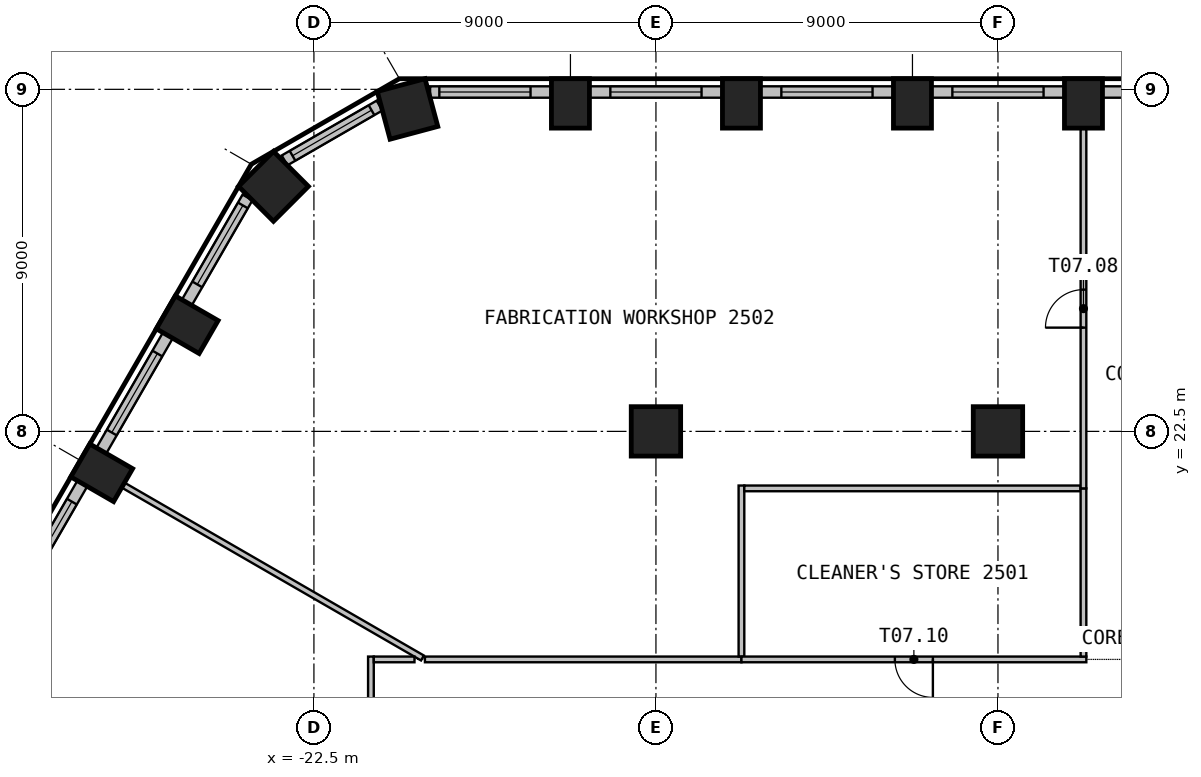
"""IFC4 building model, lengths in metres.
Left out: names, types, materials, properties, quantities, classifications, styles, units other than length and angle.
Written with IfcOpenShell. Run it as: python <this file> out.ifc"""

import sys

from ifc_helpers import new_model, si_unit, direction, frame, frame_2d, origin, origin_2d, place, context, subcontext, project, spatial, rectangle, circle, extrude, element, fill, save


model = new_model("IFC4")
c1 = context("Model", 3, precision=1e-05, world=origin(), true_north=direction((0.0, 1.0)))
c2 = subcontext(c1, "Body", "Model", "MODEL_VIEW")
j1 = project(units=[si_unit("LENGTHUNIT", "METRE"), si_unit("PLANEANGLEUNIT", "RADIAN")], contexts=[c1])
p1 = place(None, origin())
s1 = spatial("IfcSite", under=j1, at=p1, CompositionType="ELEMENT")
p2 = place(p1, origin())
s2 = spatial("IfcBuilding", under=s1, at=p2, CompositionType="ELEMENT")
p3 = place(p2, frame((0.0, 0.0, 104.7)))
s3 = spatial("IfcBuildingStorey", under=s2, at=p3, CompositionType="ELEMENT", Elevation=104.7)
for number, where, z_axis, x_axis in (
    (1, (-2.25, 31.13, 0.0), (0.0, 0.0, 1.0), (-1.0, 0.0, 0.0)),
    (2, (-6.75, 31.13, 0.0), (0.0, 0.0, 1.0), (-1.0, 0.0, 0.0)),
    (3, (-11.25, 31.13, 0.0), (0.0, 0.0, 1.0), (-1.0, 0.0, 0.0)),
    (4, (-15.75, 31.13, 0.0), (0.0, 0.0, 1.0), (-1.0, 0.0, 0.0)),
):
    element("IfcColumn", number, at=place(p3, frame(where, z_axis=z_axis, x_axis=x_axis)), inside=s3, PredefinedType="COLUMN", context=c2, shape_type="SweptSolid", body=[
        extrude(rectangle(XDim=1.0, YDim=1.3, at=origin_2d()), origin(), (0.0, 0.0, 1.0), 3.525),
    ])
for number, where, z_axis, x_axis in (
    (5, (-20.037, 30.984, 0.0), (0.0, 0.0, 1.0), (-0.966, -0.259, 0.0)),
    (6, (-23.564, 28.947, 0.0), (0.0, 0.0, 1.0), (-0.707, -0.707, 0.0)),
):
    element("IfcColumn", number, at=place(p3, frame(where, z_axis=z_axis, x_axis=x_axis)), inside=s3, PredefinedType="COLUMN", context=c2, shape_type="SweptSolid", body=[
        extrude(rectangle(XDim=1.3, YDim=1.3, at=origin_2d()), origin(), (0.0, 0.0, 1.0), 3.525),
    ])
for number, where, z_axis, x_axis in (
    (7, (-25.834, 25.308, 0.0), (0.0, 0.0, 1.0), (-0.5, -0.866, 0.0)),
    (8, (-28.084, 21.411, 0.0), (0.0, 0.0, 1.0), (-0.5, -0.866, 0.0)),
):
    element("IfcColumn", number, at=place(p3, frame(where, z_axis=z_axis, x_axis=x_axis)), inside=s3, PredefinedType="COLUMN", context=c2, shape_type="SweptSolid", body=[
        extrude(rectangle(XDim=1.0, YDim=1.3, at=origin_2d()), origin(), (0.0, 0.0, 1.0), 3.525),
    ])
for number, where, z_axis, x_axis in (
    (9, (-13.5, 22.5, 0.0), (0.0, 0.0, 1.0), (1.0, 0.0, 0.0)),
    (10, (-4.5, 22.5, 0.0), (0.0, 0.0, 1.0), (1.0, 0.0, 0.0)),
):
    element("IfcColumn", number, at=place(p3, frame(where, z_axis=z_axis, x_axis=x_axis)), inside=s3, PredefinedType="COLUMN", context=c2, shape_type="SweptSolid", body=[
        extrude(circle(Radius=0.65, at=origin_2d()), origin(), (0.0, 0.0, 1.0), 3.525),
    ])
p4 = place(p3, frame((1.75, 31.43, 0.0), z_axis=(0.0, 0.0, 1.0), x_axis=(-1.0, 0.0, 0.0)))
e11 = element("IfcWall", 11, at=p4, inside=s3, PredefinedType="SOLIDWALL", context=c2, shape_type="SweptSolid", body=[
    extrude(rectangle(XDim=3.499, YDim=0.3, at=frame_2d((1.75, 0.0))), origin(), (0.0, 0.0, 1.0), 3.525),
])
p5 = place(p4, frame((0.55, 0.0, 0.9)))
e12 = element("IfcOpeningElement", 12, at=p5, cuts=e11, PredefinedType="OPENING", context=c2, shape_type="SweptSolid", body=[
    extrude(rectangle(XDim=2.4, YDim=2.1, at=frame_2d((1.2, 1.05))), frame((0.0, 0.16, 0.0), z_axis=(0.0, -1.0, 0.0), x_axis=(1.0, 0.0, 0.0)), (0.0, 0.0, 1.0), 0.32),
])
p6 = place(p3, frame((-2.75, 31.43, 0.0), z_axis=(0.0, 0.0, 1.0), x_axis=(-1.0, 0.0, 0.0)))
e13 = element("IfcWall", 13, at=p6, inside=s3, PredefinedType="SOLIDWALL", context=c2, shape_type="SweptSolid", body=[
    extrude(rectangle(XDim=3.499, YDim=0.3, at=frame_2d((1.75, 0.0))), origin(), (0.0, 0.0, 1.0), 3.525),
])
p7 = place(p6, frame((0.55, 0.0, 0.9)))
e14 = element("IfcOpeningElement", 14, at=p7, cuts=e13, PredefinedType="OPENING", context=c2, shape_type="SweptSolid", body=[
    extrude(rectangle(XDim=2.4, YDim=2.1, at=frame_2d((1.2, 1.05))), frame((0.0, 0.16, 0.0), z_axis=(0.0, -1.0, 0.0), x_axis=(1.0, 0.0, 0.0)), (0.0, 0.0, 1.0), 0.32),
])
p8 = place(p3, frame((-7.25, 31.43, 0.0), z_axis=(0.0, 0.0, 1.0), x_axis=(-1.0, 0.0, 0.0)))
e15 = element("IfcWall", 15, at=p8, inside=s3, PredefinedType="SOLIDWALL", context=c2, shape_type="SweptSolid", body=[
    extrude(rectangle(XDim=3.499, YDim=0.3, at=frame_2d((1.75, 0.0))), origin(), (0.0, 0.0, 1.0), 3.525),
])
p9 = place(p8, frame((0.55, 0.0, 0.9)))
e16 = element("IfcOpeningElement", 16, at=p9, cuts=e15, PredefinedType="OPENING", context=c2, shape_type="SweptSolid", body=[
    extrude(rectangle(XDim=2.4, YDim=2.1, at=frame_2d((1.2, 1.05))), frame((0.0, 0.16, 0.0), z_axis=(0.0, -1.0, 0.0), x_axis=(1.0, 0.0, 0.0)), (0.0, 0.0, 1.0), 0.32),
])
p10 = place(p3, frame((-11.75, 31.43, 0.0), z_axis=(0.0, 0.0, 1.0), x_axis=(-1.0, 0.0, 0.0)))
e17 = element("IfcWall", 17, at=p10, inside=s3, PredefinedType="SOLIDWALL", context=c2, shape_type="SweptSolid", body=[
    extrude(rectangle(XDim=3.499, YDim=0.3, at=frame_2d((1.75, 0.0))), origin(), (0.0, 0.0, 1.0), 3.525),
])
p11 = place(p10, frame((0.55, 0.0, 0.9)))
e18 = element("IfcOpeningElement", 18, at=p11, cuts=e17, PredefinedType="OPENING", context=c2, shape_type="SweptSolid", body=[
    extrude(rectangle(XDim=2.4, YDim=2.1, at=frame_2d((1.2, 1.05))), frame((0.0, 0.16, 0.0), z_axis=(0.0, -1.0, 0.0), x_axis=(1.0, 0.0, 0.0)), (0.0, 0.0, 1.0), 0.32),
])
p12 = place(p3, frame((-16.25, 31.43, 0.0), z_axis=(0.0, 0.0, 1.0), x_axis=(-1.0, 0.0, 0.0)))
e19 = element("IfcWall", 19, at=p12, inside=s3, PredefinedType="SOLIDWALL", context=c2, shape_type="SweptSolid", body=[
    extrude(rectangle(XDim=3.192, YDim=0.3, at=frame_2d((1.596, 0.0))), origin(), (0.0, 0.0, 1.0), 3.525),
])
p13 = place(p12, frame((0.55, 0.0, 0.9)))
e20 = element("IfcOpeningElement", 20, at=p13, cuts=e19, PredefinedType="OPENING", context=c2, shape_type="SweptSolid", body=[
    extrude(rectangle(XDim=2.4, YDim=2.1, at=frame_2d((1.2, 1.05))), frame((0.0, 0.16, 0.0), z_axis=(0.0, -1.0, 0.0), x_axis=(1.0, 0.0, 0.0)), (0.0, 0.0, 1.0), 0.32),
])
p14 = place(p3, frame((-20.774, 31.073, 0.0), z_axis=(0.0, 0.0, 1.0), x_axis=(-0.866053149362, -0.49995194017, 0.0)))
e21 = element("IfcWall", 21, at=p14, inside=s3, PredefinedType="SOLIDWALL", context=c2, shape_type="SweptSolid", body=[
    extrude(rectangle(XDim=2.885, YDim=0.3, at=frame_2d((1.443, 0.0))), origin(), (0.0, 0.0, 1.0), 3.525),
])
p15 = place(p14, frame((0.243, 0.0, 0.9)))
e22 = element("IfcOpeningElement", 22, at=p15, cuts=e21, PredefinedType="OPENING", context=c2, shape_type="SweptSolid", body=[
    extrude(rectangle(XDim=2.4, YDim=2.1, at=frame_2d((1.2, 1.05))), frame((0.0, 0.16, 0.0), z_axis=(0.0, -1.0, 0.0), x_axis=(1.0, 0.0, 0.0)), (0.0, 0.0, 1.0), 0.32),
])
p16 = place(p3, frame((-24.248, 28.656, 0.0), z_axis=(0.0, 0.0, 1.0), x_axis=(-0.500004907028, -0.866022570692, 0.0)))
e23 = element("IfcWall", 23, at=p16, inside=s3, PredefinedType="SOLIDWALL", context=c2, shape_type="SweptSolid", body=[
    extrude(rectangle(XDim=3.192, YDim=0.3, at=frame_2d((1.596, 0.0))), origin(), (0.0, 0.0, 1.0), 3.525),
])
p17 = place(p16, frame((0.243, 0.0, 0.9)))
e24 = element("IfcOpeningElement", 24, at=p17, cuts=e23, PredefinedType="OPENING", context=c2, shape_type="SweptSolid", body=[
    extrude(rectangle(XDim=2.4, YDim=2.1, at=frame_2d((1.2, 1.05))), frame((0.0, 0.16, 0.0), z_axis=(0.0, -1.0, 0.0), x_axis=(1.0, 0.0, 0.0)), (0.0, 0.0, 1.0), 0.32),
])
p18 = place(p3, frame((-26.344, 25.024, 0.0), z_axis=(0.0, 0.0, 1.0), x_axis=(-0.499996256241, -0.866027565234, 0.0)))
e25 = element("IfcWall", 25, at=p18, inside=s3, PredefinedType="SOLIDWALL", context=c2, shape_type="SweptSolid", body=[
    extrude(rectangle(XDim=3.499, YDim=0.3, at=frame_2d((1.75, 0.0))), origin(), (0.0, 0.0, 1.0), 3.525),
])
p19 = place(p18, frame((0.55, 0.0, 0.9)))
e26 = element("IfcOpeningElement", 26, at=p19, cuts=e25, PredefinedType="OPENING", context=c2, shape_type="SweptSolid", body=[
    extrude(rectangle(XDim=2.4, YDim=2.1, at=frame_2d((1.2, 1.05))), frame((0.0, 0.16, 0.0), z_axis=(0.0, -1.0, 0.0), x_axis=(1.0, 0.0, 0.0)), (0.0, 0.0, 1.0), 0.32),
])
p20 = place(p3, frame((-28.594, 21.127, 0.0), z_axis=(0.0, 0.0, 1.0), x_axis=(-0.499996256241, -0.866027565234, 0.0)))
e27 = element("IfcWall", 27, at=p20, inside=s3, PredefinedType="SOLIDWALL", context=c2, shape_type="SweptSolid", body=[
    extrude(rectangle(XDim=3.499, YDim=0.3, at=frame_2d((1.75, 0.0))), origin(), (0.0, 0.0, 1.0), 3.525),
])
p21 = place(p20, frame((0.55, 0.0, 0.9)))
e28 = element("IfcOpeningElement", 28, at=p21, cuts=e27, PredefinedType="OPENING", context=c2, shape_type="SweptSolid", body=[
    extrude(rectangle(XDim=2.4, YDim=2.1, at=frame_2d((1.2, 1.05))), frame((0.0, 0.16, 0.0), z_axis=(0.0, -1.0, 0.0), x_axis=(1.0, 0.0, 0.0)), (0.0, 0.0, 1.0), 0.32),
])
p22 = place(p3, frame((-27.504, 21.076, 0.0), z_axis=(0.0, 0.0, 1.0), x_axis=(0.866004606565, -0.500036020111, 0.0)))
e29 = element("IfcWall", 29, at=p22, inside=s3, PredefinedType="PARTITIONING", context=c2, shape_type="SweptSolid", body=[
    extrude(rectangle(XDim=9.076, YDim=0.15, at=frame_2d((4.538, 0.0))), origin(), (0.0, 0.0, 1.0), 3.525),
])
p23 = place(p3, frame((-21.0, 16.575, 0.0), z_axis=(0.0, 0.0, 1.0), x_axis=(0.0, -1.0, 0.0)))
e30 = element("IfcWall", 30, at=p23, inside=s3, PredefinedType="PARTITIONING", context=c2, shape_type="SweptSolid", body=[
    extrude(rectangle(XDim=14.25, YDim=0.15, at=frame_2d((7.125, 0.0))), origin(), (0.0, 0.0, 1.0), 3.525),
])
p24 = place(p23, frame((6.625, 0.0, 0.0)))
e31 = element("IfcOpeningElement", 31, at=p24, cuts=e30, PredefinedType="OPENING", context=c2, shape_type="SweptSolid", body=[
    extrude(rectangle(XDim=1.0, YDim=2.1, at=frame_2d((0.5, 1.05))), frame((0.0, 0.085, 0.0), z_axis=(0.0, -1.0, 0.0), x_axis=(1.0, 0.0, 0.0)), (0.0, 0.0, 1.0), 0.17),
])
p25 = place(p3, frame((-19.854, 16.5, 0.0), z_axis=(0.0, 0.0, 1.0), x_axis=(-1.0, 0.0, 0.0)))
e32 = element("IfcWall", 32, at=p25, inside=s3, PredefinedType="PARTITIONING", context=c2, shape_type="SweptSolid", body=[
    extrude(rectangle(XDim=1.071, YDim=0.15, at=frame_2d((0.536, 0.0))), origin(), (0.0, 0.0, 1.0), 3.525),
])
p26 = place(p3, frame((-11.25, 16.5, 0.0), z_axis=(0.0, 0.0, 1.0), x_axis=(-1.0, 0.0, 0.0)))
e33 = element("IfcWall", 33, at=p26, inside=s3, PredefinedType="PARTITIONING", context=c2, shape_type="SweptSolid", body=[
    extrude(rectangle(XDim=8.329, YDim=0.15, at=frame_2d((4.165, 0.0))), origin(), (0.0, 0.0, 1.0), 3.525),
])
p27 = place(p3, frame((-11.25, 21.075, 0.0), z_axis=(0.0, 0.0, 1.0), x_axis=(0.0, -1.0, 0.0)))
e34 = element("IfcWall", 34, at=p27, inside=s3, PredefinedType="PARTITIONING", context=c2, shape_type="SweptSolid", body=[
    extrude(rectangle(XDim=4.5, YDim=0.15, at=frame_2d((2.25, 0.0))), origin(), (0.0, 0.0, 1.0), 3.525),
])
p28 = place(p3, frame((-2.175, 16.5, 0.0), z_axis=(0.0, 0.0, 1.0), x_axis=(-1.0, 0.0, 0.0)))
e35 = element("IfcWall", 35, at=p28, inside=s3, PredefinedType="PARTITIONING", context=c2, shape_type="SweptSolid", body=[
    extrude(rectangle(XDim=9.075, YDim=0.15, at=frame_2d((4.538, 0.0))), origin(), (0.0, 0.0, 1.0), 3.525),
])
p29 = place(p28, frame((4.038, 0.0, 0.0)))
e36 = element("IfcOpeningElement", 36, at=p29, cuts=e35, PredefinedType="OPENING", context=c2, shape_type="SweptSolid", body=[
    extrude(rectangle(XDim=1.0, YDim=2.1, at=frame_2d((0.5, 1.05))), frame((0.0, 0.085, 0.0), z_axis=(0.0, -1.0, 0.0), x_axis=(1.0, 0.0, 0.0)), (0.0, 0.0, 1.0), 0.17),
])
p30 = place(p3, frame((-2.325, 21.0, 0.0), z_axis=(0.0, 0.0, 1.0), x_axis=(-1.0, 0.0, 0.0)))
e37 = element("IfcWall", 37, at=p30, inside=s3, PredefinedType="PARTITIONING", context=c2, shape_type="SweptSolid", body=[
    extrude(rectangle(XDim=8.85, YDim=0.15, at=frame_2d((4.425, 0.0))), origin(), (0.0, 0.0, 1.0), 3.525),
])
p31 = place(p3, frame((-2.25, 16.575, 0.0), z_axis=(0.0, 0.0, 1.0), x_axis=(0.0, 1.0, 0.0)))
e38 = element("IfcWall", 38, at=p31, inside=s3, PredefinedType="PARTITIONING", context=c2, shape_type="SweptSolid", body=[
    extrude(rectangle(XDim=4.425, YDim=0.15, at=frame_2d((2.212, 0.0))), origin(), (0.0, 0.0, 1.0), 3.525),
])
p32 = place(p3, frame((-2.25, 21.0, 0.0), z_axis=(0.0, 0.0, 1.0), x_axis=(0.0, 1.0, 0.0)))
e39 = element("IfcWall", 39, at=p32, inside=s3, PredefinedType="PARTITIONING", context=c2, shape_type="SweptSolid", body=[
    extrude(rectangle(XDim=9.46, YDim=0.15, at=frame_2d((4.73, 0.0))), origin(), (0.0, 0.0, 1.0), 3.525),
])
p33 = place(p32, frame((4.23, 0.0, 0.0)))
e40 = element("IfcOpeningElement", 40, at=p33, cuts=e39, PredefinedType="OPENING", context=c2, shape_type="SweptSolid", body=[
    extrude(rectangle(XDim=1.0, YDim=2.1, at=frame_2d((0.5, 1.05))), frame((0.0, 0.085, 0.0), z_axis=(0.0, -1.0, 0.0), x_axis=(1.0, 0.0, 0.0)), (0.0, 0.0, 1.0), 0.17),
])
p34 = place(p7, origin())
e41 = element("IfcWindow", 41, at=p34, inside=s3, PartitioningType="SINGLE_PANEL", PredefinedType="WINDOW", context=c2, shape_type="SweptSolid", body=[
    extrude(rectangle(XDim=2.4, YDim=2.1, at=frame_2d((1.2, 1.05))), frame((0.0, 0.03, 0.0), z_axis=(0.0, -1.0, 0.0), x_axis=(1.0, 0.0, 0.0)), (0.0, 0.0, 1.0), 0.06),
])
fill(e14, e41)
p35 = place(p9, origin())
e42 = element("IfcWindow", 42, at=p35, inside=s3, PartitioningType="SINGLE_PANEL", PredefinedType="WINDOW", context=c2, shape_type="SweptSolid", body=[
    extrude(rectangle(XDim=2.4, YDim=2.1, at=frame_2d((1.2, 1.05))), frame((0.0, 0.03, 0.0), z_axis=(0.0, -1.0, 0.0), x_axis=(1.0, 0.0, 0.0)), (0.0, 0.0, 1.0), 0.06),
])
fill(e16, e42)
p36 = place(p11, origin())
e43 = element("IfcWindow", 43, at=p36, inside=s3, PartitioningType="SINGLE_PANEL", PredefinedType="WINDOW", context=c2, shape_type="SweptSolid", body=[
    extrude(rectangle(XDim=2.4, YDim=2.1, at=frame_2d((1.2, 1.05))), frame((0.0, 0.03, 0.0), z_axis=(0.0, -1.0, 0.0), x_axis=(1.0, 0.0, 0.0)), (0.0, 0.0, 1.0), 0.06),
])
fill(e18, e43)
p37 = place(p13, origin())
e44 = element("IfcWindow", 44, at=p37, inside=s3, PartitioningType="SINGLE_PANEL", PredefinedType="WINDOW", context=c2, shape_type="SweptSolid", body=[
    extrude(rectangle(XDim=2.4, YDim=2.1, at=frame_2d((1.2, 1.05))), frame((0.0, 0.03, 0.0), z_axis=(0.0, -1.0, 0.0), x_axis=(1.0, 0.0, 0.0)), (0.0, 0.0, 1.0), 0.06),
])
fill(e20, e44)
p38 = place(p15, origin())
e45 = element("IfcWindow", 45, at=p38, inside=s3, PartitioningType="SINGLE_PANEL", PredefinedType="WINDOW", context=c2, shape_type="SweptSolid", body=[
    extrude(rectangle(XDim=2.4, YDim=2.1, at=frame_2d((1.2, 1.05))), frame((0.0, 0.03, 0.0), z_axis=(0.0, -1.0, 0.0), x_axis=(1.0, 0.0, 0.0)), (0.0, 0.0, 1.0), 0.06),
])
fill(e22, e45)
p39 = place(p17, origin())
e46 = element("IfcWindow", 46, at=p39, inside=s3, PartitioningType="SINGLE_PANEL", PredefinedType="WINDOW", context=c2, shape_type="SweptSolid", body=[
    extrude(rectangle(XDim=2.4, YDim=2.1, at=frame_2d((1.2, 1.05))), frame((0.0, 0.03, 0.0), z_axis=(0.0, -1.0, 0.0), x_axis=(1.0, 0.0, 0.0)), (0.0, 0.0, 1.0), 0.06),
])
fill(e24, e46)
p40 = place(p19, origin())
e47 = element("IfcWindow", 47, at=p40, inside=s3, PartitioningType="SINGLE_PANEL", PredefinedType="WINDOW", context=c2, shape_type="SweptSolid", body=[
    extrude(rectangle(XDim=2.4, YDim=2.1, at=frame_2d((1.2, 1.05))), frame((0.0, 0.03, 0.0), z_axis=(0.0, -1.0, 0.0), x_axis=(1.0, 0.0, 0.0)), (0.0, 0.0, 1.0), 0.06),
])
fill(e26, e47)
p41 = place(p21, origin())
e48 = element("IfcWindow", 48, at=p41, inside=s3, PartitioningType="SINGLE_PANEL", PredefinedType="WINDOW", context=c2, shape_type="SweptSolid", body=[
    extrude(rectangle(XDim=2.4, YDim=2.1, at=frame_2d((1.2, 1.05))), frame((0.0, 0.03, 0.0), z_axis=(0.0, -1.0, 0.0), x_axis=(1.0, 0.0, 0.0)), (0.0, 0.0, 1.0), 0.06),
])
fill(e28, e48)
p42 = place(p33, origin())
e49 = element("IfcDoor", 49, at=p42, inside=s3, OperationType="SINGLE_SWING_RIGHT", PredefinedType="DOOR", context=c2, shape_type="SweptSolid", body=[
    extrude(rectangle(XDim=1.0, YDim=2.1, at=frame_2d((0.5, 1.05))), frame((0.0, 0.025, 0.0), z_axis=(0.0, -1.0, 0.0), x_axis=(1.0, 0.0, 0.0)), (0.0, 0.0, 1.0), 0.05),
])
fill(e40, e49)
p43 = place(p29, origin())
e50 = element("IfcDoor", 50, at=p43, inside=s3, OperationType="SINGLE_SWING_RIGHT", PredefinedType="DOOR", context=c2, shape_type="SweptSolid", body=[
    extrude(rectangle(XDim=1.0, YDim=2.1, at=frame_2d((0.5, 1.05))), frame((0.0, 0.025, 0.0), z_axis=(0.0, -1.0, 0.0), x_axis=(1.0, 0.0, 0.0)), (0.0, 0.0, 1.0), 0.05),
])
fill(e36, e50)
save(model, sys.argv[1])
